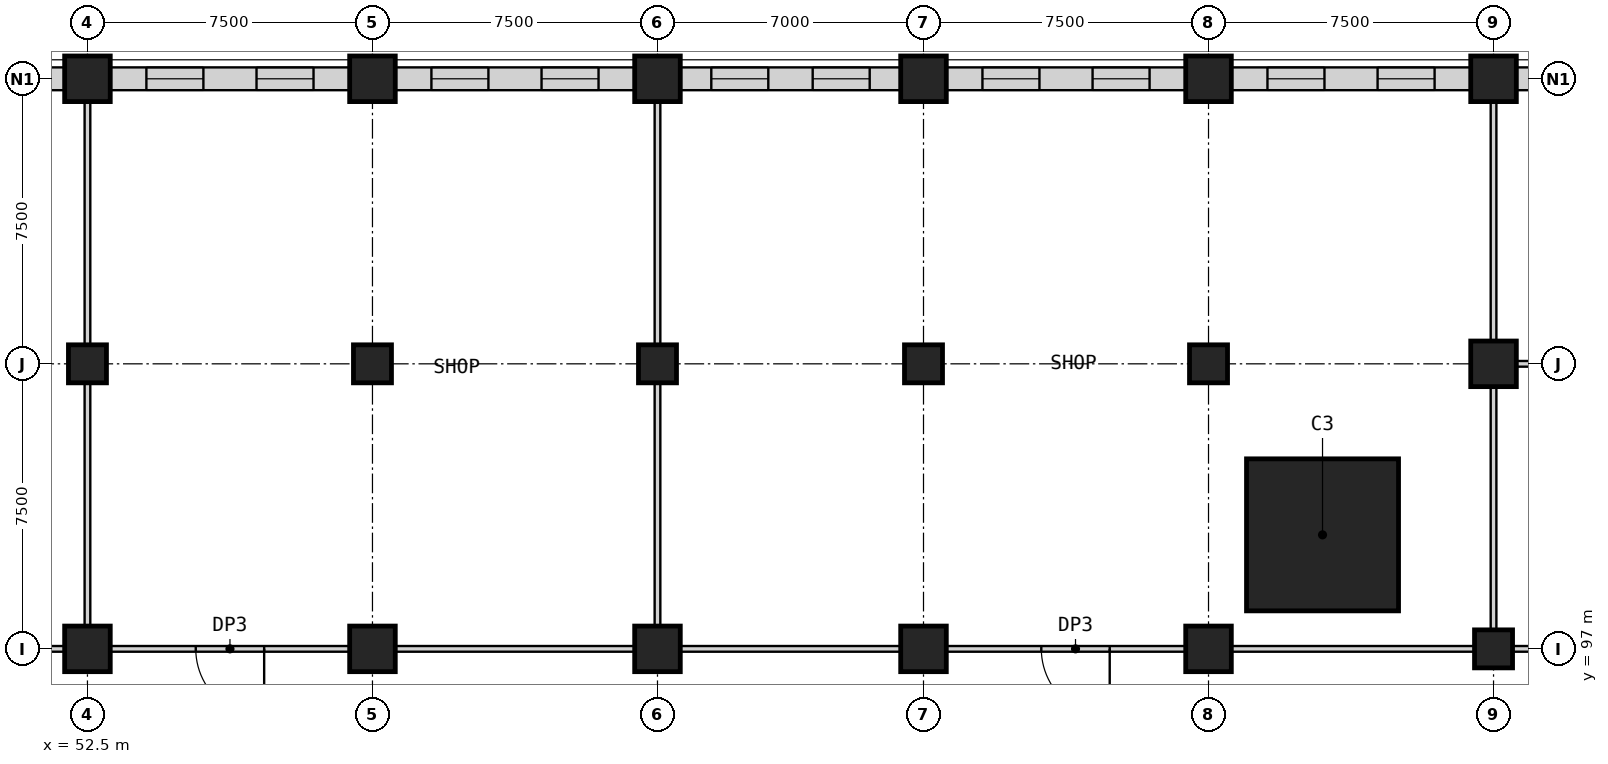
"""IFC4 building model, lengths in metres.
Left out: names, types, materials, properties, quantities, classifications, styles, units other than length and angle.
Written with IfcOpenShell. Run it as: python <this file> out.ifc"""

import sys

from ifc_helpers import new_model, si_unit, direction, frame, frame_2d, origin, origin_2d, place, context, subcontext, project, spatial, rectangle, extrude, element, fill, save


model = new_model("IFC4")
c1 = context("Model", 3, precision=1e-05, world=origin(), true_north=direction((0.0, 1.0)))
c2 = subcontext(c1, "Body", "Model", "MODEL_VIEW")
j1 = project(units=[si_unit("LENGTHUNIT", "METRE"), si_unit("PLANEANGLEUNIT", "RADIAN")], contexts=[c1])
p1 = place(None, origin())
s1 = spatial("IfcSite", under=j1, at=p1, CompositionType="ELEMENT")
p2 = place(p1, origin())
s2 = spatial("IfcBuilding", under=s1, at=p2, CompositionType="ELEMENT")
p3 = place(p2, frame((0.0, 0.0, 8.0)))
s3 = spatial("IfcBuildingStorey", under=s2, at=p3, CompositionType="ELEMENT", Elevation=8.0)
p4 = place(p3, frame((52.5, 97.0, 0.0), z_axis=(0.0, 0.0, 1.0), x_axis=(1.0, 0.0, 0.0)))
e1 = element("IfcColumn", 1, at=p4, inside=s3, PredefinedType="COLUMN", context=c2, shape_type="SweptSolid", body=[
    extrude(rectangle(XDim=1.2, YDim=1.2, at=origin_2d()), origin(), (0.0, 0.0, 1.0), 5.5),
])
p5 = place(p3, frame((52.5, 104.5, 0.0), z_axis=(0.0, 0.0, 1.0), x_axis=(1.0, 0.0, 0.0)))
e2 = element("IfcColumn", 2, at=p5, inside=s3, PredefinedType="COLUMN", context=c2, shape_type="SweptSolid", body=[
    extrude(rectangle(XDim=1.0, YDim=1.0, at=origin_2d()), origin(), (0.0, 0.0, 1.0), 5.5),
])
p6 = place(p3, frame((60.0, 97.0, 0.0), z_axis=(0.0, 0.0, 1.0), x_axis=(1.0, 0.0, 0.0)))
e3 = element("IfcColumn", 3, at=p6, inside=s3, PredefinedType="COLUMN", context=c2, shape_type="SweptSolid", body=[
    extrude(rectangle(XDim=1.2, YDim=1.2, at=origin_2d()), origin(), (0.0, 0.0, 1.0), 5.5),
])
p7 = place(p3, frame((60.0, 104.5, 0.0), z_axis=(0.0, 0.0, 1.0), x_axis=(1.0, 0.0, 0.0)))
e4 = element("IfcColumn", 4, at=p7, inside=s3, PredefinedType="COLUMN", context=c2, shape_type="SweptSolid", body=[
    extrude(rectangle(XDim=1.0, YDim=1.0, at=origin_2d()), origin(), (0.0, 0.0, 1.0), 5.5),
])
p8 = place(p3, frame((67.5, 97.0, 0.0), z_axis=(0.0, 0.0, 1.0), x_axis=(1.0, 0.0, 0.0)))
e5 = element("IfcColumn", 5, at=p8, inside=s3, PredefinedType="COLUMN", context=c2, shape_type="SweptSolid", body=[
    extrude(rectangle(XDim=1.2, YDim=1.2, at=origin_2d()), origin(), (0.0, 0.0, 1.0), 5.5),
])
p9 = place(p3, frame((67.5, 104.5, 0.0), z_axis=(0.0, 0.0, 1.0), x_axis=(1.0, 0.0, 0.0)))
e6 = element("IfcColumn", 6, at=p9, inside=s3, PredefinedType="COLUMN", context=c2, shape_type="SweptSolid", body=[
    extrude(rectangle(XDim=1.0, YDim=1.0, at=origin_2d()), origin(), (0.0, 0.0, 1.0), 5.5),
])
p10 = place(p3, frame((74.5, 97.0, 0.0), z_axis=(0.0, 0.0, 1.0), x_axis=(1.0, 0.0, 0.0)))
e7 = element("IfcColumn", 7, at=p10, inside=s3, PredefinedType="COLUMN", context=c2, shape_type="SweptSolid", body=[
    extrude(rectangle(XDim=1.2, YDim=1.2, at=origin_2d()), origin(), (0.0, 0.0, 1.0), 5.5),
])
p11 = place(p3, frame((74.5, 104.5, 0.0), z_axis=(0.0, 0.0, 1.0), x_axis=(1.0, 0.0, 0.0)))
e8 = element("IfcColumn", 8, at=p11, inside=s3, PredefinedType="COLUMN", context=c2, shape_type="SweptSolid", body=[
    extrude(rectangle(XDim=1.0, YDim=1.0, at=origin_2d()), origin(), (0.0, 0.0, 1.0), 5.5),
])
p12 = place(p3, frame((82.0, 97.0, 0.0), z_axis=(0.0, 0.0, 1.0), x_axis=(1.0, 0.0, 0.0)))
e9 = element("IfcColumn", 9, at=p12, inside=s3, PredefinedType="COLUMN", context=c2, shape_type="SweptSolid", body=[
    extrude(rectangle(XDim=1.2, YDim=1.2, at=origin_2d()), origin(), (0.0, 0.0, 1.0), 5.5),
])
for number, where, z_axis, x_axis in (
    (10, (82.0, 104.5, 0.0), (0.0, 0.0, 1.0), (1.0, 0.0, 0.0)),
    (11, (89.5, 97.0, 0.0), (0.0, 0.0, 1.0), (1.0, 0.0, 0.0)),
):
    element("IfcColumn", number, at=place(p3, frame(where, z_axis=z_axis, x_axis=x_axis)), inside=s3, PredefinedType="COLUMN", context=c2, shape_type="SweptSolid", body=[
        extrude(rectangle(XDim=1.0, YDim=1.0, at=origin_2d()), origin(), (0.0, 0.0, 1.0), 5.5),
    ])
p13 = place(p3, frame((85.0, 100.0, 0.0), z_axis=(0.0, 0.0, 1.0), x_axis=(1.0, 0.0, 0.0)))
e12 = element("IfcColumn", 12, at=p13, inside=s3, PredefinedType="COLUMN", context=c2, shape_type="SweptSolid", body=[
    extrude(rectangle(XDim=4.0, YDim=4.0, at=origin_2d()), origin(), (0.0, 0.0, 1.0), 5.5),
])
for number, where, z_axis, x_axis in (
    (13, (52.5, 112.0, 0.0), (0.0, 0.0, 1.0), (1.0, 0.0, 0.0)),
    (14, (60.0, 112.0, 0.0), (0.0, 0.0, 1.0), (1.0, 0.0, 0.0)),
    (15, (67.5, 112.0, 0.0), (0.0, 0.0, 1.0), (1.0, 0.0, 0.0)),
    (16, (74.5, 112.0, 0.0), (0.0, 0.0, 1.0), (1.0, 0.0, 0.0)),
    (17, (82.0, 112.0, 0.0), (0.0, 0.0, 1.0), (1.0, 0.0, 0.0)),
    (18, (89.5, 104.5, 0.0), (0.0, 0.0, 1.0), (1.0, 0.0, 0.0)),
    (19, (89.5, 112.0, 0.0), (0.0, 0.0, 1.0), (1.0, 0.0, 0.0)),
):
    element("IfcColumn", number, at=place(p3, frame(where, z_axis=z_axis, x_axis=x_axis)), inside=s3, PredefinedType="COLUMN", context=c2, shape_type="SweptSolid", body=[
        extrude(rectangle(XDim=1.2, YDim=1.2, at=origin_2d()), origin(), (0.0, 0.0, 1.0), 5.5),
    ])
p14 = place(p3, frame((45.6, 97.0, 0.0), z_axis=(0.0, 0.0, 1.0), x_axis=(1.0, 0.0, 0.0)))
e20 = element("IfcWall", 20, at=p14, inside=s3, PredefinedType="PARTITIONING", context=c2, shape_type="SweptSolid", body=[
    extrude(rectangle(XDim=6.3, YDim=0.15, at=frame_2d((3.15, 0.0))), origin(), (0.0, 0.0, 1.0), 5.2),
])
p15 = place(p3, frame((59.4, 97.0, 0.0), z_axis=(0.0, 0.0, 1.0), x_axis=(-1.0, 0.0, 0.0)))
e21 = element("IfcWall", 21, at=p15, inside=s3, PredefinedType="PARTITIONING", context=c2, shape_type="SweptSolid", body=[
    extrude(rectangle(XDim=6.3, YDim=0.15, at=frame_2d((3.15, 0.0))), origin(), (0.0, 0.0, 1.0), 5.2),
])
p16 = place(p15, frame((2.25, 0.0, 0.0)))
e22 = element("IfcOpeningElement", 22, at=p16, cuts=e21, PredefinedType="OPENING", context=c2, shape_type="SweptSolid", body=[
    extrude(rectangle(XDim=1.8, YDim=2.4, at=frame_2d((0.9, 1.2))), frame((0.0, 0.085, 0.0), z_axis=(0.0, -1.0, 0.0), x_axis=(1.0, 0.0, 0.0)), (0.0, 0.0, 1.0), 0.17),
])
p17 = place(p3, frame((60.6, 97.0, 0.0), z_axis=(0.0, 0.0, 1.0), x_axis=(1.0, 0.0, 0.0)))
e23 = element("IfcWall", 23, at=p17, inside=s3, PredefinedType="PARTITIONING", context=c2, shape_type="SweptSolid", body=[
    extrude(rectangle(XDim=6.3, YDim=0.15, at=frame_2d((3.15, 0.0))), origin(), (0.0, 0.0, 1.0), 5.2),
])
p18 = place(p3, frame((68.1, 97.0, 0.0), z_axis=(0.0, 0.0, 1.0), x_axis=(1.0, 0.0, 0.0)))
e24 = element("IfcWall", 24, at=p18, inside=s3, PredefinedType="PARTITIONING", context=c2, shape_type="SweptSolid", body=[
    extrude(rectangle(XDim=5.8, YDim=0.15, at=frame_2d((2.9, 0.0))), origin(), (0.0, 0.0, 1.0), 5.2),
])
p19 = place(p3, frame((81.4, 97.0, 0.0), z_axis=(0.0, 0.0, 1.0), x_axis=(-1.0, 0.0, 0.0)))
e25 = element("IfcWall", 25, at=p19, inside=s3, PredefinedType="PARTITIONING", context=c2, shape_type="SweptSolid", body=[
    extrude(rectangle(XDim=6.3, YDim=0.15, at=frame_2d((3.15, 0.0))), origin(), (0.0, 0.0, 1.0), 5.2),
])
p20 = place(p19, frame((2.0, 0.0, 0.0)))
e26 = element("IfcOpeningElement", 26, at=p20, cuts=e25, PredefinedType="OPENING", context=c2, shape_type="SweptSolid", body=[
    extrude(rectangle(XDim=1.8, YDim=2.4, at=frame_2d((0.9, 1.2))), frame((0.0, 0.085, 0.0), z_axis=(0.0, -1.0, 0.0), x_axis=(1.0, 0.0, 0.0)), (0.0, 0.0, 1.0), 0.17),
])
for number, where, z_axis, x_axis in (
    (27, (82.6, 97.0, 0.0), (0.0, 0.0, 1.0), (1.0, 0.0, 0.0)),
    (28, (90.0, 97.0, 0.0), (0.0, 0.0, 1.0), (1.0, 0.0, 0.0)),
):
    element("IfcWall", number, at=place(p3, frame(where, z_axis=z_axis, x_axis=x_axis)), inside=s3, PredefinedType="PARTITIONING", context=c2, shape_type="SweptSolid", body=[
        extrude(rectangle(XDim=6.4, YDim=0.15, at=frame_2d((3.2, 0.0))), origin(), (0.0, 0.0, 1.0), 5.2),
    ])
p21 = place(p3, frame((45.6, 112.0, 0.0), z_axis=(0.0, 0.0, 1.0), x_axis=(1.0, 0.0, 0.0)))
e29 = element("IfcWall", 29, at=p21, inside=s3, PredefinedType="PARTITIONING", context=c2, shape_type="SweptSolid", body=[
    extrude(rectangle(XDim=6.3, YDim=0.6, at=frame_2d((3.15, 0.0))), origin(), (0.0, 0.0, 1.0), 4.6),
])
p22 = place(p21, frame((0.951, 0.0, 0.9)))
e30 = element("IfcOpeningElement", 30, at=p22, cuts=e29, PredefinedType="OPENING", context=c2, shape_type="SweptSolid", body=[
    extrude(rectangle(XDim=1.5, YDim=2.8, at=frame_2d((0.75, 1.4))), frame((0.0, 0.31, 0.0), z_axis=(0.0, -1.0, 0.0), x_axis=(1.0, 0.0, 0.0)), (0.0, 0.0, 1.0), 0.62),
])
p23 = place(p21, frame((3.849, 0.0, 0.9)))
e31 = element("IfcOpeningElement", 31, at=p23, cuts=e29, PredefinedType="OPENING", context=c2, shape_type="SweptSolid", body=[
    extrude(rectangle(XDim=1.5, YDim=2.8, at=frame_2d((0.75, 1.4))), frame((0.0, 0.31, 0.0), z_axis=(0.0, -1.0, 0.0), x_axis=(1.0, 0.0, 0.0)), (0.0, 0.0, 1.0), 0.62),
])
p24 = place(p3, frame((53.1, 112.0, 0.0), z_axis=(0.0, 0.0, 1.0), x_axis=(1.0, 0.0, 0.0)))
e32 = element("IfcWall", 32, at=p24, inside=s3, PredefinedType="PARTITIONING", context=c2, shape_type="SweptSolid", body=[
    extrude(rectangle(XDim=6.3, YDim=0.6, at=frame_2d((3.15, 0.0))), origin(), (0.0, 0.0, 1.0), 4.6),
])
p25 = place(p24, frame((0.951, 0.0, 0.9)))
e33 = element("IfcOpeningElement", 33, at=p25, cuts=e32, PredefinedType="OPENING", context=c2, shape_type="SweptSolid", body=[
    extrude(rectangle(XDim=1.5, YDim=2.8, at=frame_2d((0.75, 1.4))), frame((0.0, 0.31, 0.0), z_axis=(0.0, -1.0, 0.0), x_axis=(1.0, 0.0, 0.0)), (0.0, 0.0, 1.0), 0.62),
])
p26 = place(p24, frame((3.849, 0.0, 0.9)))
e34 = element("IfcOpeningElement", 34, at=p26, cuts=e32, PredefinedType="OPENING", context=c2, shape_type="SweptSolid", body=[
    extrude(rectangle(XDim=1.5, YDim=2.8, at=frame_2d((0.75, 1.4))), frame((0.0, 0.31, 0.0), z_axis=(0.0, -1.0, 0.0), x_axis=(1.0, 0.0, 0.0)), (0.0, 0.0, 1.0), 0.62),
])
p27 = place(p3, frame((60.6, 112.0, 0.0), z_axis=(0.0, 0.0, 1.0), x_axis=(1.0, 0.0, 0.0)))
e35 = element("IfcWall", 35, at=p27, inside=s3, PredefinedType="PARTITIONING", context=c2, shape_type="SweptSolid", body=[
    extrude(rectangle(XDim=6.3, YDim=0.6, at=frame_2d((3.15, 0.0))), origin(), (0.0, 0.0, 1.0), 4.6),
])
p28 = place(p27, frame((0.951, 0.0, 0.9)))
e36 = element("IfcOpeningElement", 36, at=p28, cuts=e35, PredefinedType="OPENING", context=c2, shape_type="SweptSolid", body=[
    extrude(rectangle(XDim=1.5, YDim=2.8, at=frame_2d((0.75, 1.4))), frame((0.0, 0.31, 0.0), z_axis=(0.0, -1.0, 0.0), x_axis=(1.0, 0.0, 0.0)), (0.0, 0.0, 1.0), 0.62),
])
p29 = place(p27, frame((3.849, 0.0, 0.9)))
e37 = element("IfcOpeningElement", 37, at=p29, cuts=e35, PredefinedType="OPENING", context=c2, shape_type="SweptSolid", body=[
    extrude(rectangle(XDim=1.5, YDim=2.8, at=frame_2d((0.75, 1.4))), frame((0.0, 0.31, 0.0), z_axis=(0.0, -1.0, 0.0), x_axis=(1.0, 0.0, 0.0)), (0.0, 0.0, 1.0), 0.62),
])
p30 = place(p3, frame((68.1, 112.0, 0.0), z_axis=(0.0, 0.0, 1.0), x_axis=(1.0, 0.0, 0.0)))
e38 = element("IfcWall", 38, at=p30, inside=s3, PredefinedType="PARTITIONING", context=c2, shape_type="SweptSolid", body=[
    extrude(rectangle(XDim=5.8, YDim=0.6, at=frame_2d((2.9, 0.0))), origin(), (0.0, 0.0, 1.0), 4.6),
])
p31 = place(p30, frame((0.816, 0.0, 0.9)))
e39 = element("IfcOpeningElement", 39, at=p31, cuts=e38, PredefinedType="OPENING", context=c2, shape_type="SweptSolid", body=[
    extrude(rectangle(XDim=1.5, YDim=2.8, at=frame_2d((0.75, 1.4))), frame((0.0, 0.31, 0.0), z_axis=(0.0, -1.0, 0.0), x_axis=(1.0, 0.0, 0.0)), (0.0, 0.0, 1.0), 0.62),
])
p32 = place(p30, frame((3.484, 0.0, 0.9)))
e40 = element("IfcOpeningElement", 40, at=p32, cuts=e38, PredefinedType="OPENING", context=c2, shape_type="SweptSolid", body=[
    extrude(rectangle(XDim=1.5, YDim=2.8, at=frame_2d((0.75, 1.4))), frame((0.0, 0.31, 0.0), z_axis=(0.0, -1.0, 0.0), x_axis=(1.0, 0.0, 0.0)), (0.0, 0.0, 1.0), 0.62),
])
p33 = place(p3, frame((75.1, 112.0, 0.0), z_axis=(0.0, 0.0, 1.0), x_axis=(1.0, 0.0, 0.0)))
e41 = element("IfcWall", 41, at=p33, inside=s3, PredefinedType="PARTITIONING", context=c2, shape_type="SweptSolid", body=[
    extrude(rectangle(XDim=6.3, YDim=0.6, at=frame_2d((3.15, 0.0))), origin(), (0.0, 0.0, 1.0), 4.6),
])
p34 = place(p33, frame((0.951, 0.0, 0.9)))
e42 = element("IfcOpeningElement", 42, at=p34, cuts=e41, PredefinedType="OPENING", context=c2, shape_type="SweptSolid", body=[
    extrude(rectangle(XDim=1.5, YDim=2.8, at=frame_2d((0.75, 1.4))), frame((0.0, 0.31, 0.0), z_axis=(0.0, -1.0, 0.0), x_axis=(1.0, 0.0, 0.0)), (0.0, 0.0, 1.0), 0.62),
])
p35 = place(p33, frame((3.849, 0.0, 0.9)))
e43 = element("IfcOpeningElement", 43, at=p35, cuts=e41, PredefinedType="OPENING", context=c2, shape_type="SweptSolid", body=[
    extrude(rectangle(XDim=1.5, YDim=2.8, at=frame_2d((0.75, 1.4))), frame((0.0, 0.31, 0.0), z_axis=(0.0, -1.0, 0.0), x_axis=(1.0, 0.0, 0.0)), (0.0, 0.0, 1.0), 0.62),
])
p36 = place(p3, frame((82.6, 112.0, 0.0), z_axis=(0.0, 0.0, 1.0), x_axis=(1.0, 0.0, 0.0)))
e44 = element("IfcWall", 44, at=p36, inside=s3, PredefinedType="PARTITIONING", context=c2, shape_type="SweptSolid", body=[
    extrude(rectangle(XDim=6.3, YDim=0.6, at=frame_2d((3.15, 0.0))), origin(), (0.0, 0.0, 1.0), 4.6),
])
p37 = place(p36, frame((0.951, 0.0, 0.9)))
e45 = element("IfcOpeningElement", 45, at=p37, cuts=e44, PredefinedType="OPENING", context=c2, shape_type="SweptSolid", body=[
    extrude(rectangle(XDim=1.5, YDim=2.8, at=frame_2d((0.75, 1.4))), frame((0.0, 0.31, 0.0), z_axis=(0.0, -1.0, 0.0), x_axis=(1.0, 0.0, 0.0)), (0.0, 0.0, 1.0), 0.62),
])
p38 = place(p36, frame((3.849, 0.0, 0.9)))
e46 = element("IfcOpeningElement", 46, at=p38, cuts=e44, PredefinedType="OPENING", context=c2, shape_type="SweptSolid", body=[
    extrude(rectangle(XDim=1.5, YDim=2.8, at=frame_2d((0.75, 1.4))), frame((0.0, 0.31, 0.0), z_axis=(0.0, -1.0, 0.0), x_axis=(1.0, 0.0, 0.0)), (0.0, 0.0, 1.0), 0.62),
])
p39 = place(p3, frame((90.1, 112.0, 0.0), z_axis=(0.0, 0.0, 1.0), x_axis=(1.0, 0.0, 0.0)))
e47 = element("IfcWall", 47, at=p39, inside=s3, PredefinedType="PARTITIONING", context=c2, shape_type="SweptSolid", body=[
    extrude(rectangle(XDim=6.3, YDim=0.6, at=frame_2d((3.15, 0.0))), origin(), (0.0, 0.0, 1.0), 4.6),
])
p40 = place(p39, frame((0.951, 0.0, 0.9)))
e48 = element("IfcOpeningElement", 48, at=p40, cuts=e47, PredefinedType="OPENING", context=c2, shape_type="SweptSolid", body=[
    extrude(rectangle(XDim=1.5, YDim=2.8, at=frame_2d((0.75, 1.4))), frame((0.0, 0.31, 0.0), z_axis=(0.0, -1.0, 0.0), x_axis=(1.0, 0.0, 0.0)), (0.0, 0.0, 1.0), 0.62),
])
p41 = place(p39, frame((3.849, 0.0, 0.9)))
e49 = element("IfcOpeningElement", 49, at=p41, cuts=e47, PredefinedType="OPENING", context=c2, shape_type="SweptSolid", body=[
    extrude(rectangle(XDim=1.5, YDim=2.8, at=frame_2d((0.75, 1.4))), frame((0.0, 0.31, 0.0), z_axis=(0.0, -1.0, 0.0), x_axis=(1.0, 0.0, 0.0)), (0.0, 0.0, 1.0), 0.62),
])
p42 = place(p3, frame((90.1, 104.5, 0.0), z_axis=(0.0, 0.0, 1.0), x_axis=(1.0, 0.0, 0.0)))
e50 = element("IfcWall", 50, at=p42, inside=s3, PredefinedType="PARTITIONING", context=c2, shape_type="SweptSolid", body=[
    extrude(rectangle(XDim=6.3, YDim=0.15, at=frame_2d((3.15, 0.0))), origin(), (0.0, 0.0, 1.0), 5.2),
])
for number, where, z_axis, x_axis in (
    (51, (52.5, 97.6, 0.0), (0.0, 0.0, 1.0), (0.0, 1.0, 0.0)),
    (52, (52.5, 105.0, 0.0), (0.0, 0.0, 1.0), (0.0, 1.0, 0.0)),
    (53, (89.5, 97.5, 0.0), (0.0, 0.0, 1.0), (0.0, 1.0, 0.0)),
):
    element("IfcWall", number, at=place(p3, frame(where, z_axis=z_axis, x_axis=x_axis)), inside=s3, PredefinedType="PARTITIONING", context=c2, shape_type="SweptSolid", body=[
        extrude(rectangle(XDim=6.4, YDim=0.15, at=frame_2d((3.2, 0.0))), origin(), (0.0, 0.0, 1.0), 5.2),
    ])
p43 = place(p3, frame((89.5, 105.1, 0.0), z_axis=(0.0, 0.0, 1.0), x_axis=(0.0, 1.0, 0.0)))
e54 = element("IfcWall", 54, at=p43, inside=s3, PredefinedType="PARTITIONING", context=c2, shape_type="SweptSolid", body=[
    extrude(rectangle(XDim=6.3, YDim=0.15, at=frame_2d((3.15, 0.0))), origin(), (0.0, 0.0, 1.0), 5.2),
])
for number, where, z_axis, x_axis in (
    (55, (67.5, 97.6, 0.0), (0.0, 0.0, 1.0), (0.0, 1.0, 0.0)),
    (56, (67.5, 105.0, 0.0), (0.0, 0.0, 1.0), (0.0, 1.0, 0.0)),
):
    element("IfcWall", number, at=place(p3, frame(where, z_axis=z_axis, x_axis=x_axis)), inside=s3, PredefinedType="PARTITIONING", context=c2, shape_type="SweptSolid", body=[
        extrude(rectangle(XDim=6.4, YDim=0.15, at=frame_2d((3.2, 0.0))), origin(), (0.0, 0.0, 1.0), 5.2),
    ])
p44 = place(p16, origin())
e57 = element("IfcDoor", 57, at=p44, inside=s3, OperationType="SINGLE_SWING_LEFT", PredefinedType="DOOR", context=c2, shape_type="SweptSolid", body=[
    extrude(rectangle(XDim=1.8, YDim=2.4, at=frame_2d((0.9, 1.2))), frame((0.0, 0.025, 0.0), z_axis=(0.0, -1.0, 0.0), x_axis=(1.0, 0.0, 0.0)), (0.0, 0.0, 1.0), 0.05),
])
fill(e22, e57)
p45 = place(p20, origin())
e58 = element("IfcDoor", 58, at=p45, inside=s3, OperationType="SINGLE_SWING_LEFT", PredefinedType="DOOR", context=c2, shape_type="SweptSolid", body=[
    extrude(rectangle(XDim=1.8, YDim=2.4, at=frame_2d((0.9, 1.2))), frame((0.0, 0.025, 0.0), z_axis=(0.0, -1.0, 0.0), x_axis=(1.0, 0.0, 0.0)), (0.0, 0.0, 1.0), 0.05),
])
fill(e26, e58)
p46 = place(p25, origin())
e59 = element("IfcWindow", 59, at=p46, inside=s3, PartitioningType="SINGLE_PANEL", PredefinedType="WINDOW", context=c2, shape_type="SweptSolid", body=[
    extrude(rectangle(XDim=1.5, YDim=2.8, at=frame_2d((0.75, 1.4))), frame((0.0, 0.03, 0.0), z_axis=(0.0, -1.0, 0.0), x_axis=(1.0, 0.0, 0.0)), (0.0, 0.0, 1.0), 0.06),
])
fill(e33, e59)
p47 = place(p26, origin())
e60 = element("IfcWindow", 60, at=p47, inside=s3, PartitioningType="SINGLE_PANEL", PredefinedType="WINDOW", context=c2, shape_type="SweptSolid", body=[
    extrude(rectangle(XDim=1.5, YDim=2.8, at=frame_2d((0.75, 1.4))), frame((0.0, 0.03, 0.0), z_axis=(0.0, -1.0, 0.0), x_axis=(1.0, 0.0, 0.0)), (0.0, 0.0, 1.0), 0.06),
])
fill(e34, e60)
p48 = place(p28, origin())
e61 = element("IfcWindow", 61, at=p48, inside=s3, PartitioningType="SINGLE_PANEL", PredefinedType="WINDOW", context=c2, shape_type="SweptSolid", body=[
    extrude(rectangle(XDim=1.5, YDim=2.8, at=frame_2d((0.75, 1.4))), frame((0.0, 0.03, 0.0), z_axis=(0.0, -1.0, 0.0), x_axis=(1.0, 0.0, 0.0)), (0.0, 0.0, 1.0), 0.06),
])
fill(e36, e61)
p49 = place(p29, origin())
e62 = element("IfcWindow", 62, at=p49, inside=s3, PartitioningType="SINGLE_PANEL", PredefinedType="WINDOW", context=c2, shape_type="SweptSolid", body=[
    extrude(rectangle(XDim=1.5, YDim=2.8, at=frame_2d((0.75, 1.4))), frame((0.0, 0.03, 0.0), z_axis=(0.0, -1.0, 0.0), x_axis=(1.0, 0.0, 0.0)), (0.0, 0.0, 1.0), 0.06),
])
fill(e37, e62)
p50 = place(p31, origin())
e63 = element("IfcWindow", 63, at=p50, inside=s3, PartitioningType="SINGLE_PANEL", PredefinedType="WINDOW", context=c2, shape_type="SweptSolid", body=[
    extrude(rectangle(XDim=1.5, YDim=2.8, at=frame_2d((0.75, 1.4))), frame((0.0, 0.03, 0.0), z_axis=(0.0, -1.0, 0.0), x_axis=(1.0, 0.0, 0.0)), (0.0, 0.0, 1.0), 0.06),
])
fill(e39, e63)
p51 = place(p32, origin())
e64 = element("IfcWindow", 64, at=p51, inside=s3, PartitioningType="SINGLE_PANEL", PredefinedType="WINDOW", context=c2, shape_type="SweptSolid", body=[
    extrude(rectangle(XDim=1.5, YDim=2.8, at=frame_2d((0.75, 1.4))), frame((0.0, 0.03, 0.0), z_axis=(0.0, -1.0, 0.0), x_axis=(1.0, 0.0, 0.0)), (0.0, 0.0, 1.0), 0.06),
])
fill(e40, e64)
p52 = place(p34, origin())
e65 = element("IfcWindow", 65, at=p52, inside=s3, PartitioningType="SINGLE_PANEL", PredefinedType="WINDOW", context=c2, shape_type="SweptSolid", body=[
    extrude(rectangle(XDim=1.5, YDim=2.8, at=frame_2d((0.75, 1.4))), frame((0.0, 0.03, 0.0), z_axis=(0.0, -1.0, 0.0), x_axis=(1.0, 0.0, 0.0)), (0.0, 0.0, 1.0), 0.06),
])
fill(e42, e65)
p53 = place(p35, origin())
e66 = element("IfcWindow", 66, at=p53, inside=s3, PartitioningType="SINGLE_PANEL", PredefinedType="WINDOW", context=c2, shape_type="SweptSolid", body=[
    extrude(rectangle(XDim=1.5, YDim=2.8, at=frame_2d((0.75, 1.4))), frame((0.0, 0.03, 0.0), z_axis=(0.0, -1.0, 0.0), x_axis=(1.0, 0.0, 0.0)), (0.0, 0.0, 1.0), 0.06),
])
fill(e43, e66)
p54 = place(p37, origin())
e67 = element("IfcWindow", 67, at=p54, inside=s3, PartitioningType="SINGLE_PANEL", PredefinedType="WINDOW", context=c2, shape_type="SweptSolid", body=[
    extrude(rectangle(XDim=1.5, YDim=2.8, at=frame_2d((0.75, 1.4))), frame((0.0, 0.03, 0.0), z_axis=(0.0, -1.0, 0.0), x_axis=(1.0, 0.0, 0.0)), (0.0, 0.0, 1.0), 0.06),
])
fill(e45, e67)
p55 = place(p38, origin())
e68 = element("IfcWindow", 68, at=p55, inside=s3, PartitioningType="SINGLE_PANEL", PredefinedType="WINDOW", context=c2, shape_type="SweptSolid", body=[
    extrude(rectangle(XDim=1.5, YDim=2.8, at=frame_2d((0.75, 1.4))), frame((0.0, 0.03, 0.0), z_axis=(0.0, -1.0, 0.0), x_axis=(1.0, 0.0, 0.0)), (0.0, 0.0, 1.0), 0.06),
])
fill(e46, e68)
save(model, sys.argv[1])
